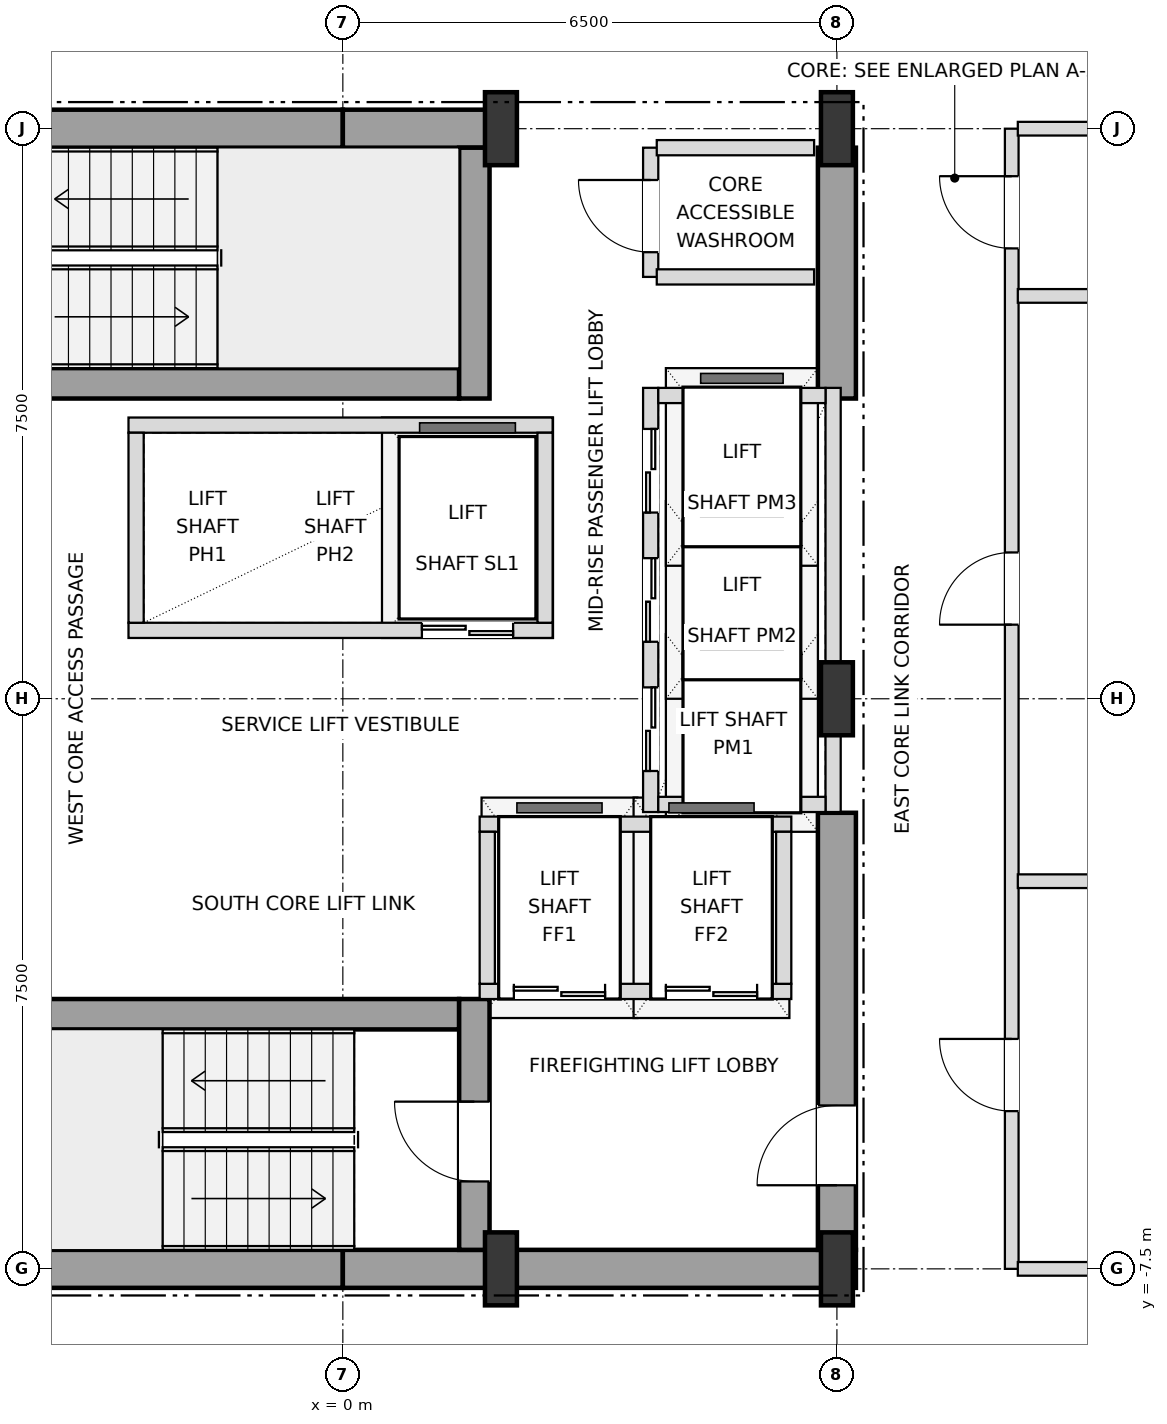
"""IFC4 building model, lengths in metres.
Left out: names, types, materials, properties, quantities, classifications, styles, units other than length and angle.
Written with IfcOpenShell. Run it as: python <this file> out.ifc"""

import sys

from ifc_helpers import new_model, si_unit, direction, frame, frame_2d, origin, origin_2d, place, context, subcontext, project, spatial, rectangle, i_section, extrude, element, fill, save


model = new_model("IFC4")
c1 = context("Model", 3, precision=1e-05, world=origin(), true_north=direction((0.0, 1.0)))
c2 = subcontext(c1, "Body", "Model", "MODEL_VIEW")
j1 = project(units=[si_unit("LENGTHUNIT", "METRE"), si_unit("PLANEANGLEUNIT", "RADIAN")], contexts=[c1])
p1 = place(None, origin())
s1 = spatial("IfcSite", under=j1, at=p1, CompositionType="ELEMENT")
p2 = place(p1, origin())
s2 = spatial("IfcBuilding", under=s1, at=p2, CompositionType="ELEMENT")
p3 = place(p2, frame((0.0, 0.0, 133.2)))
s3 = spatial("IfcBuildingStorey", under=s2, at=p3, CompositionType="ELEMENT", Elevation=133.2)
for number, where, z_axis, x_axis in (
    (1, (2.08, -7.5, 0.0), (0.0, 0.0, 1.0), (1.0, 0.0, 0.0)),
    (2, (6.5, -7.5, 0.0), (0.0, 0.0, 1.0), (1.0, 0.0, 0.0)),
    (3, (6.5, 0.0, 0.0), (0.0, 0.0, 1.0), (1.0, 0.0, 0.0)),
    (4, (2.08, 7.5, 0.0), (0.0, 0.0, 1.0), (1.0, 0.0, 0.0)),
    (5, (6.5, 7.5, 0.0), (0.0, 0.0, 1.0), (1.0, 0.0, 0.0)),
):
    element("IfcColumn", number, at=place(p3, frame(where, z_axis=z_axis, x_axis=x_axis)), inside=s3, PredefinedType="COLUMN", context=c2, shape_type="SweptSolid", body=[
        extrude(i_section(OverallWidth=0.42, OverallDepth=0.96, WebThickness=0.022, FlangeThickness=0.034, at=origin_2d()), origin(), (0.0, 0.0, 1.0), 3.6),
    ])
for number, where, z_axis, x_axis in (
    (6, (-6.75, -7.5, 0.0), (0.0, 0.0, 1.0), (1.0, 0.0, 0.0)),
    (7, (0.0, -7.5, 0.0), (0.0, 0.0, 1.0), (1.0, 0.0, 0.0)),
):
    element("IfcWall", number, at=place(p3, frame(where, z_axis=z_axis, x_axis=x_axis)), inside=s3, PredefinedType="SHEAR", context=c2, shape_type="SweptSolid", body=[
        extrude(rectangle(XDim=6.75, YDim=0.5, at=frame_2d((3.375, 0.0))), origin(), (0.0, 0.0, 1.0), 3.38),
    ])
p4 = place(p3, frame((-6.75, 7.5, 0.0), z_axis=(0.0, 0.0, 1.0), x_axis=(1.0, 0.0, 0.0)))
e8 = element("IfcWall", 8, at=p4, inside=s3, PredefinedType="SHEAR", context=c2, shape_type="SweptSolid", body=[
    extrude(rectangle(XDim=6.75, YDim=0.5, at=frame_2d((3.375, 0.0))), origin(), (0.0, 0.0, 1.0), 3.38),
])
p5 = place(p4, frame((1.65, 0.0, 0.0)))
e9 = element("IfcOpeningElement", 9, at=p5, cuts=e8, PredefinedType="OPENING", context=c2, shape_type="SweptSolid", body=[
    extrude(rectangle(XDim=1.05, YDim=2.15, at=frame_2d((0.525, 1.075))), frame((0.0, 0.26, 0.0), z_axis=(0.0, -1.0, 0.0), x_axis=(1.0, 0.0, 0.0)), (0.0, 0.0, 1.0), 0.52),
])
p6 = place(p3, frame((0.0, 7.5, 0.0), z_axis=(0.0, 0.0, 1.0), x_axis=(1.0, 0.0, 0.0)))
e10 = element("IfcWall", 10, at=p6, inside=s3, PredefinedType="SHEAR", context=c2, shape_type="SweptSolid", body=[
    extrude(rectangle(XDim=2.08, YDim=0.5, at=frame_2d((1.04, 0.0))), origin(), (0.0, 0.0, 1.0), 3.38),
])
p7 = place(p3, frame((6.5, -7.25, 0.0), z_axis=(0.0, 0.0, 1.0), x_axis=(0.0, 1.0, 0.0)))
e11 = element("IfcWall", 11, at=p7, inside=s3, PredefinedType="SHEAR", context=c2, shape_type="SweptSolid", body=[
    extrude(rectangle(XDim=5.75, YDim=0.5, at=frame_2d((2.875, 0.0))), origin(), (0.0, 0.0, 1.0), 3.38),
])
p8 = place(p7, frame((0.85, 0.0, 0.0)))
e12 = element("IfcOpeningElement", 12, at=p8, cuts=e11, PredefinedType="OPENING", context=c2, shape_type="SweptSolid", body=[
    extrude(rectangle(XDim=1.05, YDim=2.15, at=frame_2d((0.525, 1.075))), frame((0.0, 0.26, 0.0), z_axis=(0.0, -1.0, 0.0), x_axis=(1.0, 0.0, 0.0)), (0.0, 0.0, 1.0), 0.52),
])
p9 = place(p3, frame((6.5, 3.95, 0.0), z_axis=(0.0, 0.0, 1.0), x_axis=(0.0, 1.0, 0.0)))
e13 = element("IfcWall", 13, at=p9, inside=s3, PredefinedType="SHEAR", context=c2, shape_type="SweptSolid", body=[
    extrude(rectangle(XDim=3.3, YDim=0.5, at=frame_2d((1.65, 0.0))), origin(), (0.0, 0.0, 1.0), 3.38),
])
p10 = place(p3, frame((-6.25, -4.15, 0.0), z_axis=(0.0, 0.0, 1.0), x_axis=(1.0, 0.0, 0.0)))
e14 = element("IfcWall", 14, at=p10, inside=s3, PredefinedType="SHEAR", context=c2, shape_type="SweptSolid", body=[
    extrude(rectangle(XDim=7.78, YDim=0.4, at=frame_2d((3.89, 0.0))), origin(), (0.0, 0.0, 1.0), 3.38),
])
p11 = place(p3, frame((1.73, -7.25, 0.0), z_axis=(0.0, 0.0, 1.0), x_axis=(0.0, 1.0, 0.0)))
e15 = element("IfcWall", 15, at=p11, inside=s3, PredefinedType="SHEAR", context=c2, shape_type="SweptSolid", body=[
    extrude(rectangle(XDim=3.3, YDim=0.4, at=frame_2d((1.65, 0.0))), origin(), (0.0, 0.0, 1.0), 3.38),
])
p12 = place(p11, frame((0.9, 0.0, 0.0)))
e16 = element("IfcOpeningElement", 16, at=p12, cuts=e15, PredefinedType="OPENING", context=c2, shape_type="SweptSolid", body=[
    extrude(rectangle(XDim=1.05, YDim=2.15, at=frame_2d((0.525, 1.075))), frame((0.0, 0.21, 0.0), z_axis=(0.0, -1.0, 0.0), x_axis=(1.0, 0.0, 0.0)), (0.0, 0.0, 1.0), 0.42),
])
p13 = place(p3, frame((-5.55, 4.15, 0.0), z_axis=(0.0, 0.0, 1.0), x_axis=(1.0, 0.0, 0.0)))
e17 = element("IfcWall", 17, at=p13, inside=s3, PredefinedType="SHEAR", context=c2, shape_type="SweptSolid", body=[
    extrude(rectangle(XDim=7.08, YDim=0.4, at=frame_2d((3.54, 0.0))), origin(), (0.0, 0.0, 1.0), 3.38),
])
p14 = place(p3, frame((1.73, 3.95, 0.0), z_axis=(0.0, 0.0, 1.0), x_axis=(0.0, 1.0, 0.0)))
e18 = element("IfcWall", 18, at=p14, inside=s3, PredefinedType="SHEAR", context=c2, shape_type="SweptSolid", body=[
    extrude(rectangle(XDim=3.3, YDim=0.4, at=frame_2d((1.65, 0.0))), origin(), (0.0, 0.0, 1.0), 3.38),
])
p15 = place(p3, frame((4.05, -1.49, 0.0), z_axis=(0.0, 0.0, 1.0), x_axis=(0.0, 1.0, 0.0)))
e19 = element("IfcWall", 19, at=p15, inside=s3, PredefinedType="SOLIDWALL", context=c2, shape_type="SweptSolid", body=[
    extrude(rectangle(XDim=5.58, YDim=0.2, at=frame_2d((2.79, 0.0))), origin(), (0.0, 0.0, 1.0), 3.38),
])
p16 = place(p15, frame((0.54, 0.0, 0.0)))
e20 = element("IfcOpeningElement", 20, at=p16, cuts=e19, PredefinedType="OPENING", context=c2, shape_type="SweptSolid", body=[
    extrude(rectangle(XDim=1.1, YDim=2.15, at=frame_2d((0.55, 1.075))), frame((0.0, 0.11, 0.0), z_axis=(0.0, -1.0, 0.0), x_axis=(1.0, 0.0, 0.0)), (0.0, 0.0, 1.0), 0.22),
])
p17 = place(p15, frame((2.24, 0.0, 0.0)))
e21 = element("IfcOpeningElement", 21, at=p17, cuts=e19, PredefinedType="OPENING", context=c2, shape_type="SweptSolid", body=[
    extrude(rectangle(XDim=1.1, YDim=2.15, at=frame_2d((0.55, 1.075))), frame((0.0, 0.11, 0.0), z_axis=(0.0, -1.0, 0.0), x_axis=(1.0, 0.0, 0.0)), (0.0, 0.0, 1.0), 0.22),
])
p18 = place(p15, frame((3.94, 0.0, 0.0)))
e22 = element("IfcOpeningElement", 22, at=p18, cuts=e19, PredefinedType="OPENING", context=c2, shape_type="SweptSolid", body=[
    extrude(rectangle(XDim=1.1, YDim=2.15, at=frame_2d((0.55, 1.075))), frame((0.0, 0.11, 0.0), z_axis=(0.0, -1.0, 0.0), x_axis=(1.0, 0.0, 0.0)), (0.0, 0.0, 1.0), 0.22),
])
p19 = place(p3, frame((6.45, -1.49, 0.0), z_axis=(0.0, 0.0, 1.0), x_axis=(0.0, 1.0, 0.0)))
e23 = element("IfcWall", 23, at=p19, inside=s3, PredefinedType="SOLIDWALL", context=c2, shape_type="SweptSolid", body=[
    extrude(rectangle(XDim=5.58, YDim=0.2, at=frame_2d((2.79, 0.0))), origin(), (0.0, 0.0, 1.0), 2.816),
])
for number, where, z_axis, x_axis in (
    (24, (4.15, -1.39, 0.0), (0.0, 0.0, 1.0), (1.0, 0.0, 0.0)),
    (25, (4.15, 3.99, 0.0), (0.0, 0.0, 1.0), (1.0, 0.0, 0.0)),
):
    element("IfcWall", number, at=place(p3, frame(where, z_axis=z_axis, x_axis=x_axis)), inside=s3, PredefinedType="SOLIDWALL", context=c2, shape_type="SweptSolid", body=[
        extrude(rectangle(XDim=2.2, YDim=0.2, at=frame_2d((1.1, 0.0))), origin(), (0.0, 0.0, 1.0), 3.38),
    ])
p20 = place(p3, frame((-2.82, 0.9, 0.0), z_axis=(0.0, 0.0, 1.0), x_axis=(1.0, 0.0, 0.0)))
e26 = element("IfcWall", 26, at=p20, inside=s3, PredefinedType="SOLIDWALL", context=c2, shape_type="SweptSolid", body=[
    extrude(rectangle(XDim=5.58, YDim=0.2, at=frame_2d((2.79, 0.0))), origin(), (0.0, 0.0, 1.0), 3.38),
])
p21 = place(p20, frame((3.86, 0.0, 0.0)))
e27 = element("IfcOpeningElement", 27, at=p21, cuts=e26, PredefinedType="OPENING", context=c2, shape_type="SweptSolid", body=[
    extrude(rectangle(XDim=1.2, YDim=2.2, at=frame_2d((0.6, 1.1))), frame((0.0, 0.11, 0.0), z_axis=(0.0, -1.0, 0.0), x_axis=(1.0, 0.0, 0.0)), (0.0, 0.0, 1.0), 0.22),
])
p22 = place(p3, frame((-2.82, 3.6, 0.0), z_axis=(0.0, 0.0, 1.0), x_axis=(1.0, 0.0, 0.0)))
e28 = element("IfcWall", 28, at=p22, inside=s3, PredefinedType="SOLIDWALL", context=c2, shape_type="SweptSolid", body=[
    extrude(rectangle(XDim=5.58, YDim=0.2, at=frame_2d((2.79, 0.0))), origin(), (0.0, 0.0, 1.0), 3.38),
])
for number, where, z_axis, x_axis in (
    (29, (-2.72, 1.0, 0.0), (0.0, 0.0, 1.0), (0.0, 1.0, 0.0)),
    (30, (2.66, 1.0, 0.0), (0.0, 0.0, 1.0), (0.0, 1.0, 0.0)),
):
    element("IfcWall", number, at=place(p3, frame(where, z_axis=z_axis, x_axis=x_axis)), inside=s3, PredefinedType="SOLIDWALL", context=c2, shape_type="SweptSolid", body=[
        extrude(rectangle(XDim=2.5, YDim=0.2, at=frame_2d((1.25, 0.0))), origin(), (0.0, 0.0, 1.0), 3.38),
    ])
p23 = place(p3, frame((1.8, -3.85, 0.0), z_axis=(0.0, 0.0, 1.0), x_axis=(1.0, 0.0, 0.0)))
e31 = element("IfcWall", 31, at=p23, inside=s3, PredefinedType="SOLIDWALL", context=c2, shape_type="SweptSolid", body=[
    extrude(rectangle(XDim=4.1, YDim=0.2, at=frame_2d((2.05, 0.0))), origin(), (0.0, 0.0, 1.0), 3.38),
])
p24 = place(p23, frame((0.45, 0.0, 0.0)))
e32 = element("IfcOpeningElement", 32, at=p24, cuts=e31, PredefinedType="OPENING", context=c2, shape_type="SweptSolid", body=[
    extrude(rectangle(XDim=1.2, YDim=2.2, at=frame_2d((0.6, 1.1))), frame((0.0, 0.11, 0.0), z_axis=(0.0, -1.0, 0.0), x_axis=(1.0, 0.0, 0.0)), (0.0, 0.0, 1.0), 0.22),
])
p25 = place(p23, frame((2.45, 0.0, 0.0)))
e33 = element("IfcOpeningElement", 33, at=p25, cuts=e31, PredefinedType="OPENING", context=c2, shape_type="SweptSolid", body=[
    extrude(rectangle(XDim=1.2, YDim=2.2, at=frame_2d((0.6, 1.1))), frame((0.0, 0.11, 0.0), z_axis=(0.0, -1.0, 0.0), x_axis=(1.0, 0.0, 0.0)), (0.0, 0.0, 1.0), 0.22),
])
p26 = place(p3, frame((1.8, -1.65, 0.0), z_axis=(0.0, 0.0, 1.0), x_axis=(1.0, 0.0, 0.0)))
e34 = element("IfcWall", 34, at=p26, inside=s3, PredefinedType="SOLIDWALL", context=c2, shape_type="SweptSolid", body=[
    extrude(rectangle(XDim=4.1, YDim=0.2, at=frame_2d((2.05, 0.0))), origin(), (0.0, 0.0, 1.0), 3.38),
])
for number, where, z_axis, x_axis in (
    (35, (1.9, -3.75, 0.0), (0.0, 0.0, 1.0), (0.0, 1.0, 0.0)),
    (36, (5.8, -3.75, 0.0), (0.0, 0.0, 1.0), (0.0, 1.0, 0.0)),
):
    element("IfcWall", number, at=place(p3, frame(where, z_axis=z_axis, x_axis=x_axis)), inside=s3, PredefinedType="SOLIDWALL", context=c2, shape_type="SweptSolid", body=[
        extrude(rectangle(XDim=2.0, YDim=0.2, at=frame_2d((1.0, 0.0))), origin(), (0.0, 0.0, 1.0), 3.38),
    ])
p27 = place(p3, frame((4.05, 5.55, 0.0), z_axis=(0.0, 0.0, 1.0), x_axis=(0.0, 1.0, 0.0)))
e37 = element("IfcWall", 37, at=p27, inside=s3, PredefinedType="SOLIDWALL", context=c2, shape_type="SweptSolid", body=[
    extrude(rectangle(XDim=1.7, YDim=0.2, at=frame_2d((0.85, 0.0))), origin(), (0.0, 0.0, 1.0), 3.38),
])
p28 = place(p27, frame((0.325, 0.0, 0.0)))
e38 = element("IfcOpeningElement", 38, at=p28, cuts=e37, PredefinedType="OPENING", context=c2, shape_type="SweptSolid", body=[
    extrude(rectangle(XDim=0.95, YDim=2.15, at=frame_2d((0.475, 1.075))), frame((0.0, 0.11, 0.0), z_axis=(0.0, -1.0, 0.0), x_axis=(1.0, 0.0, 0.0)), (0.0, 0.0, 1.0), 0.22),
])
p29 = place(p3, frame((8.8, -7.5, 0.0), z_axis=(0.0, 0.0, 1.0), x_axis=(0.0, 1.0, 0.0)))
e39 = element("IfcWall", 39, at=p29, inside=s3, PredefinedType="PARTITIONING", context=c2, shape_type="SweptSolid", body=[
    extrude(rectangle(XDim=15.0, YDim=0.18, at=frame_2d((7.5, 0.0))), origin(), (0.0, 0.0, 1.0), 3.38),
])
p30 = place(p29, frame((2.075, 0.0, 0.0)))
e40 = element("IfcOpeningElement", 40, at=p30, cuts=e39, PredefinedType="OPENING", context=c2, shape_type="SweptSolid", body=[
    extrude(rectangle(XDim=0.95, YDim=2.15, at=frame_2d((0.475, 1.075))), frame((0.0, 0.1, 0.0), z_axis=(0.0, -1.0, 0.0), x_axis=(1.0, 0.0, 0.0)), (0.0, 0.0, 1.0), 0.2),
])
p31 = place(p29, frame((8.475, 0.0, 0.0)))
e41 = element("IfcOpeningElement", 41, at=p31, cuts=e39, PredefinedType="OPENING", context=c2, shape_type="SweptSolid", body=[
    extrude(rectangle(XDim=0.95, YDim=2.15, at=frame_2d((0.475, 1.075))), frame((0.0, 0.1, 0.0), z_axis=(0.0, -1.0, 0.0), x_axis=(1.0, 0.0, 0.0)), (0.0, 0.0, 1.0), 0.2),
])
p32 = place(p29, frame((13.425, 0.0, 0.0)))
e42 = element("IfcOpeningElement", 42, at=p32, cuts=e39, PredefinedType="OPENING", context=c2, shape_type="SweptSolid", body=[
    extrude(rectangle(XDim=0.95, YDim=2.15, at=frame_2d((0.475, 1.075))), frame((0.0, 0.1, 0.0), z_axis=(0.0, -1.0, 0.0), x_axis=(1.0, 0.0, 0.0)), (0.0, 0.0, 1.0), 0.2),
])
p33 = place(p3, frame((8.88, -7.5, 0.0), z_axis=(0.0, 0.0, 1.0), x_axis=(1.0, 0.0, 0.0)))
e43 = element("IfcWall", 43, at=p33, inside=s3, PredefinedType="PARTITIONING", context=c2, shape_type="SweptSolid", body=[
    extrude(rectangle(XDim=11.27, YDim=0.18, at=frame_2d((5.635, 0.0))), origin(), (0.0, 0.0, 1.0), 2.816),
])
for number, where, z_axis, x_axis in (
    (44, (8.88, -2.4, 0.0), (0.0, 0.0, 1.0), (1.0, 0.0, 0.0)),
    (45, (8.88, 5.3, 0.0), (0.0, 0.0, 1.0), (1.0, 0.0, 0.0)),
):
    element("IfcWall", number, at=place(p3, frame(where, z_axis=z_axis, x_axis=x_axis)), inside=s3, PredefinedType="PARTITIONING", context=c2, shape_type="SweptSolid", body=[
        extrude(rectangle(XDim=11.19, YDim=0.18, at=frame_2d((5.595, 0.0))), origin(), (0.0, 0.0, 1.0), 2.816),
    ])
for number, where, z_axis, x_axis in (
    (46, (4.13, 5.55, 0.0), (0.0, 0.0, 1.0), (1.0, 0.0, 0.0)),
    (47, (4.13, 7.25, 0.0), (0.0, 0.0, 1.0), (1.0, 0.0, 0.0)),
):
    element("IfcWall", number, at=place(p3, frame(where, z_axis=z_axis, x_axis=x_axis)), inside=s3, PredefinedType="SOLIDWALL", context=c2, shape_type="SweptSolid", body=[
        extrude(rectangle(XDim=2.07, YDim=0.2, at=frame_2d((1.035, 0.0))), origin(), (0.0, 0.0, 1.0), 3.38),
    ])
p34 = place(p3, frame((8.88, 7.5, 0.0), z_axis=(0.0, 0.0, 1.0), x_axis=(1.0, 0.0, 0.0)))
e48 = element("IfcWall", 48, at=p34, inside=s3, PredefinedType="PARTITIONING", context=c2, shape_type="SweptSolid", body=[
    extrude(rectangle(XDim=11.27, YDim=0.18, at=frame_2d((5.635, 0.0))), origin(), (0.0, 0.0, 1.0), 2.816),
])
p35 = place(p8, origin())
e49 = element("IfcDoor", 49, at=p35, inside=s3, OperationType="SINGLE_SWING_LEFT", PredefinedType="DOOR", context=c2, shape_type="SweptSolid", body=[
    extrude(rectangle(XDim=1.05, YDim=2.15, at=frame_2d((0.525, 1.075))), frame((0.0, 0.025, 0.0), z_axis=(0.0, -1.0, 0.0), x_axis=(1.0, 0.0, 0.0)), (0.0, 0.0, 1.0), 0.05),
])
fill(e12, e49)
p36 = place(p12, origin())
e50 = element("IfcDoor", 50, at=p36, inside=s3, OperationType="SINGLE_SWING_RIGHT", PredefinedType="DOOR", context=c2, shape_type="SweptSolid", body=[
    extrude(rectangle(XDim=1.05, YDim=2.15, at=frame_2d((0.525, 1.075))), frame((0.0, 0.025, 0.0), z_axis=(0.0, -1.0, 0.0), x_axis=(1.0, 0.0, 0.0)), (0.0, 0.0, 1.0), 0.05),
])
fill(e16, e50)
p37 = place(p16, origin())
e51 = element("IfcDoor", 51, at=p37, inside=s3, OperationType="DOUBLE_DOOR_SLIDING", PredefinedType="DOOR", context=c2, shape_type="SweptSolid", body=[
    extrude(rectangle(XDim=1.1, YDim=2.15, at=frame_2d((0.55, 1.075))), frame((0.0, 0.025, 0.0), z_axis=(0.0, -1.0, 0.0), x_axis=(1.0, 0.0, 0.0)), (0.0, 0.0, 1.0), 0.05),
])
fill(e20, e51)
p38 = place(p17, origin())
e52 = element("IfcDoor", 52, at=p38, inside=s3, OperationType="DOUBLE_DOOR_SLIDING", PredefinedType="DOOR", context=c2, shape_type="SweptSolid", body=[
    extrude(rectangle(XDim=1.1, YDim=2.15, at=frame_2d((0.55, 1.075))), frame((0.0, 0.025, 0.0), z_axis=(0.0, -1.0, 0.0), x_axis=(1.0, 0.0, 0.0)), (0.0, 0.0, 1.0), 0.05),
])
fill(e21, e52)
p39 = place(p18, origin())
e53 = element("IfcDoor", 53, at=p39, inside=s3, OperationType="DOUBLE_DOOR_SLIDING", PredefinedType="DOOR", context=c2, shape_type="SweptSolid", body=[
    extrude(rectangle(XDim=1.1, YDim=2.15, at=frame_2d((0.55, 1.075))), frame((0.0, 0.025, 0.0), z_axis=(0.0, -1.0, 0.0), x_axis=(1.0, 0.0, 0.0)), (0.0, 0.0, 1.0), 0.05),
])
fill(e22, e53)
p40 = place(p21, origin())
e54 = element("IfcDoor", 54, at=p40, inside=s3, OperationType="DOUBLE_DOOR_SLIDING", PredefinedType="DOOR", context=c2, shape_type="SweptSolid", body=[
    extrude(rectangle(XDim=1.2, YDim=2.2, at=frame_2d((0.6, 1.1))), frame((0.0, 0.025, 0.0), z_axis=(0.0, -1.0, 0.0), x_axis=(1.0, 0.0, 0.0)), (0.0, 0.0, 1.0), 0.05),
])
fill(e27, e54)
p41 = place(p24, origin())
e55 = element("IfcDoor", 55, at=p41, inside=s3, OperationType="DOUBLE_DOOR_SLIDING", PredefinedType="DOOR", context=c2, shape_type="SweptSolid", body=[
    extrude(rectangle(XDim=1.2, YDim=2.2, at=frame_2d((0.6, 1.1))), frame((0.0, 0.025, 0.0), z_axis=(0.0, -1.0, 0.0), x_axis=(1.0, 0.0, 0.0)), (0.0, 0.0, 1.0), 0.05),
])
fill(e32, e55)
p42 = place(p25, origin())
e56 = element("IfcDoor", 56, at=p42, inside=s3, OperationType="DOUBLE_DOOR_SLIDING", PredefinedType="DOOR", context=c2, shape_type="SweptSolid", body=[
    extrude(rectangle(XDim=1.2, YDim=2.2, at=frame_2d((0.6, 1.1))), frame((0.0, 0.025, 0.0), z_axis=(0.0, -1.0, 0.0), x_axis=(1.0, 0.0, 0.0)), (0.0, 0.0, 1.0), 0.05),
])
fill(e33, e56)
p43 = place(p28, origin())
e57 = element("IfcDoor", 57, at=p43, inside=s3, OperationType="SINGLE_SWING_RIGHT", PredefinedType="DOOR", context=c2, shape_type="SweptSolid", body=[
    extrude(rectangle(XDim=0.95, YDim=2.15, at=frame_2d((0.475, 1.075))), frame((0.0, 0.025, 0.0), z_axis=(0.0, -1.0, 0.0), x_axis=(1.0, 0.0, 0.0)), (0.0, 0.0, 1.0), 0.05),
])
fill(e38, e57)
p44 = place(p30, origin())
e58 = element("IfcDoor", 58, at=p44, inside=s3, OperationType="SINGLE_SWING_RIGHT", PredefinedType="DOOR", context=c2, shape_type="SweptSolid", body=[
    extrude(rectangle(XDim=0.95, YDim=2.15, at=frame_2d((0.475, 1.075))), frame((0.0, 0.025, 0.0), z_axis=(0.0, -1.0, 0.0), x_axis=(1.0, 0.0, 0.0)), (0.0, 0.0, 1.0), 0.05),
])
fill(e40, e58)
p45 = place(p31, origin())
e59 = element("IfcDoor", 59, at=p45, inside=s3, OperationType="SINGLE_SWING_LEFT", PredefinedType="DOOR", context=c2, shape_type="SweptSolid", body=[
    extrude(rectangle(XDim=0.95, YDim=2.15, at=frame_2d((0.475, 1.075))), frame((0.0, 0.025, 0.0), z_axis=(0.0, -1.0, 0.0), x_axis=(1.0, 0.0, 0.0)), (0.0, 0.0, 1.0), 0.05),
])
fill(e41, e59)
p46 = place(p32, origin())
e60 = element("IfcDoor", 60, at=p46, inside=s3, OperationType="SINGLE_SWING_RIGHT", PredefinedType="DOOR", context=c2, shape_type="SweptSolid", body=[
    extrude(rectangle(XDim=0.95, YDim=2.15, at=frame_2d((0.475, 1.075))), frame((0.0, 0.025, 0.0), z_axis=(0.0, -1.0, 0.0), x_axis=(1.0, 0.0, 0.0)), (0.0, 0.0, 1.0), 0.05),
])
fill(e42, e60)
save(model, sys.argv[1])
